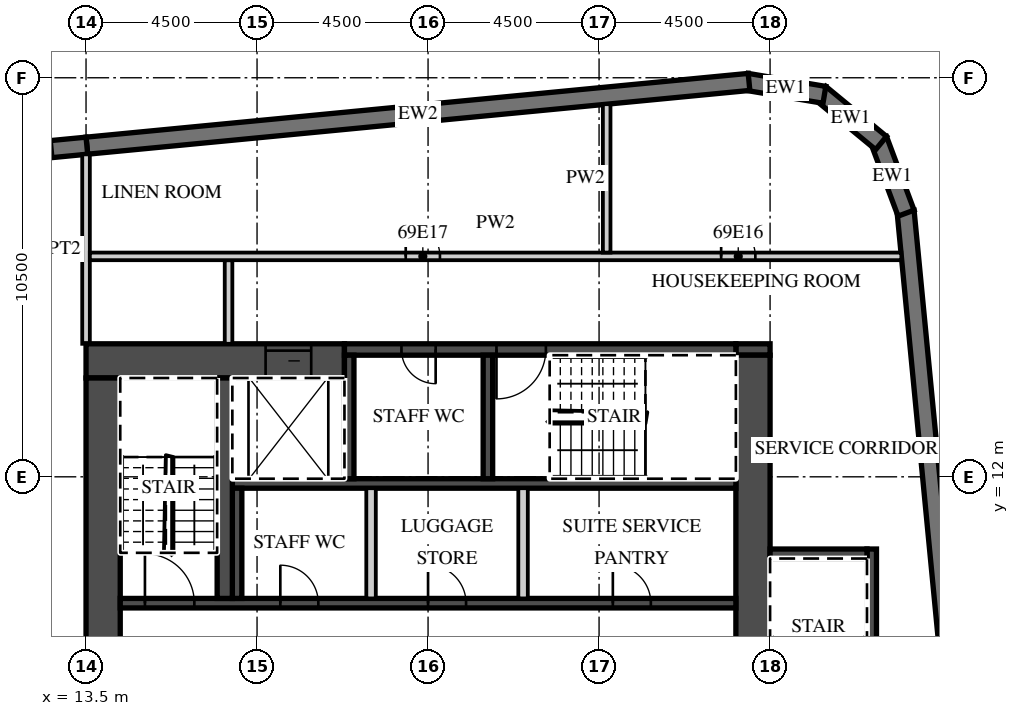
"""IFC4 building model, lengths in metres.
Left out: names, types, materials, properties, quantities, classifications, styles, units other than length and angle.
Written with IfcOpenShell. Run it as: python <this file> out.ifc"""

import sys

from ifc_helpers import new_model, si_unit, direction, frame, frame_2d, origin, place, context, subcontext, project, spatial, polyline, rectangle, outline, extrude, element, fill, save


model = new_model("IFC4")
c1 = context("Model", 3, precision=1e-05, world=origin(), true_north=direction((0.0, 1.0)))
c2 = subcontext(c1, "Body", "Model", "MODEL_VIEW")
j1 = project(units=[si_unit("LENGTHUNIT", "METRE"), si_unit("PLANEANGLEUNIT", "RADIAN")], contexts=[c1])
p1 = place(None, origin())
s1 = spatial("IfcSite", under=j1, at=p1, CompositionType="ELEMENT")
p2 = place(p1, origin())
s2 = spatial("IfcBuilding", under=s1, at=p2, CompositionType="ELEMENT")
p3 = place(p2, frame((0.0, 0.0, 278.4)))
s3 = spatial("IfcBuildingStorey", under=s2, at=p3, CompositionType="ELEMENT", Elevation=278.4)
p4 = place(p3, frame((38.132, -12.858, 0.0), z_axis=(0.0, 0.0, 1.0), x_axis=(-0.095847749461, 0.995396006082, 0.0)))
e1 = element("IfcWall", 1, at=p4, inside=s3, PredefinedType="SOLIDWALL", context=c2, shape_type="SweptSolid", body=[
    extrude(rectangle(XDim=32.0, YDim=0.45, at=frame_2d((16.0, 0.0))), origin(), (0.0, 0.0, 1.0), 3.02),
])
p5 = place(p3, frame((35.078, 18.938, 0.0), z_axis=(0.0, 0.0, 1.0), x_axis=(-0.350192909346, 0.936677599948, 0.0)))
e2 = element("IfcWall", 2, at=p5, inside=s3, PredefinedType="SOLIDWALL", context=c2, shape_type="SweptSolid", body=[
    extrude(outline(polyline([(0.0, -0.225), (2.071, -0.225), (1.95, 0.225), (0.121, 0.225), (0.0, -0.225)])), origin(), (0.0, 0.0, 1.0), 3.02),
])
p6 = place(p3, frame((34.421, 20.782, 0.0), z_axis=(0.0, 0.0, 1.0), x_axis=(-0.771593176315, 0.636116318187, 0.0)))
e3 = element("IfcWall", 3, at=p6, inside=s3, PredefinedType="SOLIDWALL", context=c2, shape_type="SweptSolid", body=[
    extrude(outline(polyline([(0.0, -0.225), (2.071, -0.225), (1.95, 0.225), (0.12, 0.225), (0.0, -0.225)])), origin(), (0.0, 0.0, 1.0), 3.02),
])
p7 = place(p3, frame((32.929, 22.051, 0.0), z_axis=(0.0, 0.0, 1.0), x_axis=(-0.986298144721, 0.164972633245, 0.0)))
e4 = element("IfcWall", 4, at=p7, inside=s3, PredefinedType="SOLIDWALL", context=c2, shape_type="SweptSolid", body=[
    extrude(outline(polyline([(0.0, -0.225), (2.07, -0.225), (1.95, 0.225), (0.121, 0.225), (0.0, -0.225)])), origin(), (0.0, 0.0, 1.0), 3.02),
])
p8 = place(p3, frame((30.946, 22.391, 0.0), z_axis=(0.0, 0.0, 1.0), x_axis=(-0.995396397117, -0.095843688398, 0.0)))
e5 = element("IfcWall", 5, at=p8, inside=s3, PredefinedType="SOLIDWALL", context=c2, shape_type="SweptSolid", body=[
    extrude(rectangle(XDim=17.505, YDim=0.45, at=frame_2d((8.752, 0.0))), origin(), (0.0, 0.0, 1.0), 3.02),
])
p9 = place(p3, frame((13.521, 20.713, 0.0), z_axis=(0.0, 0.0, 1.0), x_axis=(-0.995396277313, -0.095844932638, 0.0)))
e6 = element("IfcWall", 6, at=p9, inside=s3, PredefinedType="SOLIDWALL", context=c2, shape_type="SweptSolid", body=[
    extrude(rectangle(XDim=51.495, YDim=0.45, at=frame_2d((25.748, 0.0))), origin(), (0.0, 0.0, 1.0), 3.02),
])
p10 = place(p9, frame((0.91, 0.0, 0.45)))
e7 = element("IfcOpeningElement", 7, at=p10, cuts=e6, PredefinedType="OPENING", context=c2, shape_type="SweptSolid", body=[
    extrude(rectangle(XDim=2.7, YDim=2.25, at=frame_2d((1.35, 1.125))), frame((0.0, 0.235, 0.0), z_axis=(0.0, -1.0, 0.0), x_axis=(1.0, 0.0, 0.0)), (0.0, 0.0, 1.0), 0.47),
])
p11 = place(p9, frame((5.431, 0.0, 0.45)))
e8 = element("IfcOpeningElement", 8, at=p11, cuts=e6, PredefinedType="OPENING", context=c2, shape_type="SweptSolid", body=[
    extrude(rectangle(XDim=2.7, YDim=2.25, at=frame_2d((1.35, 1.125))), frame((0.0, 0.235, 0.0), z_axis=(0.0, -1.0, 0.0), x_axis=(1.0, 0.0, 0.0)), (0.0, 0.0, 1.0), 0.47),
])
p12 = place(p9, frame((9.952, 0.0, 0.45)))
e9 = element("IfcOpeningElement", 9, at=p12, cuts=e6, PredefinedType="OPENING", context=c2, shape_type="SweptSolid", body=[
    extrude(rectangle(XDim=2.7, YDim=2.25, at=frame_2d((1.35, 1.125))), frame((0.0, 0.235, 0.0), z_axis=(0.0, -1.0, 0.0), x_axis=(1.0, 0.0, 0.0)), (0.0, 0.0, 1.0), 0.47),
])
p13 = place(p9, frame((14.473, 0.0, 0.45)))
e10 = element("IfcOpeningElement", 10, at=p13, cuts=e6, PredefinedType="OPENING", context=c2, shape_type="SweptSolid", body=[
    extrude(rectangle(XDim=2.7, YDim=2.25, at=frame_2d((1.35, 1.125))), frame((0.0, 0.235, 0.0), z_axis=(0.0, -1.0, 0.0), x_axis=(1.0, 0.0, 0.0)), (0.0, 0.0, 1.0), 0.47),
])
p14 = place(p9, frame((18.994, 0.0, 0.45)))
e11 = element("IfcOpeningElement", 11, at=p14, cuts=e6, PredefinedType="OPENING", context=c2, shape_type="SweptSolid", body=[
    extrude(rectangle(XDim=2.7, YDim=2.25, at=frame_2d((1.35, 1.125))), frame((0.0, 0.235, 0.0), z_axis=(0.0, -1.0, 0.0), x_axis=(1.0, 0.0, 0.0)), (0.0, 0.0, 1.0), 0.47),
])
p15 = place(p9, frame((23.514, 0.0, 0.45)))
e12 = element("IfcOpeningElement", 12, at=p15, cuts=e6, PredefinedType="OPENING", context=c2, shape_type="SweptSolid", body=[
    extrude(rectangle(XDim=2.7, YDim=2.25, at=frame_2d((1.35, 1.125))), frame((0.0, 0.235, 0.0), z_axis=(0.0, -1.0, 0.0), x_axis=(1.0, 0.0, 0.0)), (0.0, 0.0, 1.0), 0.47),
])
p16 = place(p9, frame((28.035, 0.0, 0.45)))
e13 = element("IfcOpeningElement", 13, at=p16, cuts=e6, PredefinedType="OPENING", context=c2, shape_type="SweptSolid", body=[
    extrude(rectangle(XDim=2.7, YDim=2.25, at=frame_2d((1.35, 1.125))), frame((0.0, 0.235, 0.0), z_axis=(0.0, -1.0, 0.0), x_axis=(1.0, 0.0, 0.0)), (0.0, 0.0, 1.0), 0.47),
])
p17 = place(p9, frame((32.556, 0.0, 0.45)))
e14 = element("IfcOpeningElement", 14, at=p17, cuts=e6, PredefinedType="OPENING", context=c2, shape_type="SweptSolid", body=[
    extrude(rectangle(XDim=2.7, YDim=2.25, at=frame_2d((1.35, 1.125))), frame((0.0, 0.235, 0.0), z_axis=(0.0, -1.0, 0.0), x_axis=(1.0, 0.0, 0.0)), (0.0, 0.0, 1.0), 0.47),
])
p18 = place(p9, frame((37.077, 0.0, 0.45)))
e15 = element("IfcOpeningElement", 15, at=p18, cuts=e6, PredefinedType="OPENING", context=c2, shape_type="SweptSolid", body=[
    extrude(rectangle(XDim=2.7, YDim=2.25, at=frame_2d((1.35, 1.125))), frame((0.0, 0.235, 0.0), z_axis=(0.0, -1.0, 0.0), x_axis=(1.0, 0.0, 0.0)), (0.0, 0.0, 1.0), 0.47),
])
p19 = place(p9, frame((41.598, 0.0, 0.45)))
e16 = element("IfcOpeningElement", 16, at=p19, cuts=e6, PredefinedType="OPENING", context=c2, shape_type="SweptSolid", body=[
    extrude(rectangle(XDim=2.7, YDim=2.25, at=frame_2d((1.35, 1.125))), frame((0.0, 0.235, 0.0), z_axis=(0.0, -1.0, 0.0), x_axis=(1.0, 0.0, 0.0)), (0.0, 0.0, 1.0), 0.47),
])
p20 = place(p9, frame((46.118, 0.0, 0.45)))
e17 = element("IfcOpeningElement", 17, at=p20, cuts=e6, PredefinedType="OPENING", context=c2, shape_type="SweptSolid", body=[
    extrude(rectangle(XDim=2.7, YDim=2.25, at=frame_2d((1.35, 1.125))), frame((0.0, 0.235, 0.0), z_axis=(0.0, -1.0, 0.0), x_axis=(1.0, 0.0, 0.0)), (0.0, 0.0, 1.0), 0.47),
])
p21 = place(p3, frame((13.5, 15.5, 0.0), z_axis=(0.0, 0.0, 1.0), x_axis=(0.0, 1.0, 0.0)))
e18 = element("IfcWall", 18, at=p21, inside=s3, PredefinedType="PARTITIONING", context=c2, shape_type="SweptSolid", body=[
    extrude(rectangle(XDim=4.985, YDim=0.2, at=frame_2d((2.493, 0.0))), origin(), (0.0, 0.0, 1.0), 3.02),
])
p22 = place(p3, frame((13.5, 15.05, 0.0), z_axis=(0.0, 0.0, 1.0), x_axis=(1.0, 0.0, 0.0)))
e19 = element("IfcWall", 19, at=p22, inside=s3, PredefinedType="SHEAR", context=c2, shape_type="SweptSolid", body=[
    extrude(rectangle(XDim=6.8, YDim=0.9, at=frame_2d((3.4, 0.0))), origin(), (0.0, 0.0, 1.0), 3.02),
])
p23 = place(p22, frame((4.725, 0.0, 0.0)))
e20 = element("IfcOpeningElement", 20, at=p23, cuts=e19, PredefinedType="OPENING", context=c2, shape_type="SweptSolid", body=[
    extrude(rectangle(XDim=1.2, YDim=2.1, at=frame_2d((0.6, 1.05))), frame((0.0, 0.46, 0.0), z_axis=(0.0, -1.0, 0.0), x_axis=(1.0, 0.0, 0.0)), (0.0, 0.0, 1.0), 0.92),
])
p24 = place(p3, frame((30.6, 15.35, 0.0), z_axis=(0.0, 0.0, 1.0), x_axis=(1.0, 0.0, 0.0)))
e21 = element("IfcWall", 21, at=p24, inside=s3, PredefinedType="SHEAR", context=c2, shape_type="SweptSolid", body=[
    extrude(rectangle(XDim=0.9, YDim=0.3, at=frame_2d((0.45, 0.0))), origin(), (0.0, 0.0, 1.0), 3.02),
])
p25 = place(p3, frame((20.3, 15.35, 0.0), z_axis=(0.0, 0.0, 1.0), x_axis=(1.0, 0.0, 0.0)))
e22 = element("IfcWall", 22, at=p25, inside=s3, PredefinedType="SHEAR", context=c2, shape_type="SweptSolid", body=[
    extrude(rectangle(XDim=10.3, YDim=0.3, at=frame_2d((5.15, 0.0))), origin(), (0.0, 0.0, 1.0), 3.02),
])
p26 = place(p25, frame((4.0, 0.0, 0.0)))
e23 = element("IfcOpeningElement", 23, at=p26, cuts=e22, PredefinedType="OPENING", context=c2, shape_type="SweptSolid", body=[
    extrude(rectangle(XDim=1.3, YDim=2.1, at=frame_2d((0.65, 1.05))), frame((0.0, 0.16, 0.0), z_axis=(0.0, -1.0, 0.0), x_axis=(1.0, 0.0, 0.0)), (0.0, 0.0, 1.0), 0.32),
])
p27 = place(p25, frame((1.5, 0.0, 0.0)))
e24 = element("IfcOpeningElement", 24, at=p27, cuts=e22, PredefinedType="OPENING", context=c2, shape_type="SweptSolid", body=[
    extrude(rectangle(XDim=0.9, YDim=2.1, at=frame_2d((0.45, 1.05))), frame((0.0, 0.16, 0.0), z_axis=(0.0, -1.0, 0.0), x_axis=(1.0, 0.0, 0.0)), (0.0, 0.0, 1.0), 0.32),
])
p28 = place(p3, frame((31.05, 2.4, 0.0), z_axis=(0.0, 0.0, 1.0), x_axis=(0.0, 1.0, 0.0)))
e25 = element("IfcWall", 25, at=p28, inside=s3, PredefinedType="SHEAR", context=c2, shape_type="SweptSolid", body=[
    extrude(rectangle(XDim=12.8, YDim=0.9, at=frame_2d((6.4, 0.0))), origin(), (0.0, 0.0, 1.0), 3.02),
])
p29 = place(p28, frame((0.2, 0.0, 0.0)))
e26 = element("IfcOpeningElement", 26, at=p29, cuts=e25, PredefinedType="OPENING", context=c2, shape_type="SweptSolid", body=[
    extrude(rectangle(XDim=1.1, YDim=2.1, at=frame_2d((0.55, 1.05))), frame((0.0, 0.46, 0.0), z_axis=(0.0, -1.0, 0.0), x_axis=(1.0, 0.0, 0.0)), (0.0, 0.0, 1.0), 0.92),
])
p30 = place(p3, frame((13.95, 2.4, 0.0), z_axis=(0.0, 0.0, 1.0), x_axis=(0.0, 1.0, 0.0)))
e27 = element("IfcWall", 27, at=p30, inside=s3, PredefinedType="SHEAR", context=c2, shape_type="SweptSolid", body=[
    extrude(rectangle(XDim=12.2, YDim=0.9, at=frame_2d((6.1, 0.0))), origin(), (0.0, 0.0, 1.0), 3.02),
])
p31 = place(p3, frame((14.4, 8.675, 0.0), z_axis=(0.0, 0.0, 1.0), x_axis=(1.0, 0.0, 0.0)))
e28 = element("IfcWall", 28, at=p31, inside=s3, PredefinedType="SHEAR", context=c2, shape_type="SweptSolid", body=[
    extrude(rectangle(XDim=16.2, YDim=0.25, at=frame_2d((8.1, 0.0))), origin(), (0.0, 0.0, 1.0), 3.02),
])
p32 = place(p31, frame((0.65, 0.0, 0.0)))
e29 = element("IfcOpeningElement", 29, at=p32, cuts=e28, PredefinedType="OPENING", context=c2, shape_type="SweptSolid", body=[
    extrude(rectangle(XDim=1.3, YDim=2.1, at=frame_2d((0.65, 1.05))), frame((0.0, 0.135, 0.0), z_axis=(0.0, -1.0, 0.0), x_axis=(1.0, 0.0, 0.0)), (0.0, 0.0, 1.0), 0.27),
])
p33 = place(p31, frame((12.962, 0.0, 0.0)))
e30 = element("IfcOpeningElement", 30, at=p33, cuts=e28, PredefinedType="OPENING", context=c2, shape_type="SweptSolid", body=[
    extrude(rectangle(XDim=1.0, YDim=2.1, at=frame_2d((0.5, 1.05))), frame((0.0, 0.135, 0.0), z_axis=(0.0, -1.0, 0.0), x_axis=(1.0, 0.0, 0.0)), (0.0, 0.0, 1.0), 0.27),
])
p34 = place(p31, frame((8.1, 0.0, 0.0)))
e31 = element("IfcOpeningElement", 31, at=p34, cuts=e28, PredefinedType="OPENING", context=c2, shape_type="SweptSolid", body=[
    extrude(rectangle(XDim=1.0, YDim=2.1, at=frame_2d((0.5, 1.05))), frame((0.0, 0.135, 0.0), z_axis=(0.0, -1.0, 0.0), x_axis=(1.0, 0.0, 0.0)), (0.0, 0.0, 1.0), 0.27),
])
p35 = place(p31, frame((4.212, 0.0, 0.0)))
e32 = element("IfcOpeningElement", 32, at=p35, cuts=e28, PredefinedType="OPENING", context=c2, shape_type="SweptSolid", body=[
    extrude(rectangle(XDim=1.0, YDim=2.1, at=frame_2d((0.5, 1.05))), frame((0.0, 0.135, 0.0), z_axis=(0.0, -1.0, 0.0), x_axis=(1.0, 0.0, 0.0)), (0.0, 0.0, 1.0), 0.27),
])
p36 = place(p3, frame((17.35, 11.825, 0.0), z_axis=(0.0, 0.0, 1.0), x_axis=(1.0, 0.0, 0.0)))
e33 = element("IfcWall", 33, at=p36, inside=s3, PredefinedType="SHEAR", context=c2, shape_type="SweptSolid", body=[
    extrude(rectangle(XDim=13.25, YDim=0.25, at=frame_2d((6.625, 0.0))), origin(), (0.0, 0.0, 1.0), 3.02),
])
p37 = place(p3, frame((17.475, 8.8, 0.0), z_axis=(0.0, 0.0, 1.0), x_axis=(0.0, 1.0, 0.0)))
e34 = element("IfcWall", 34, at=p37, inside=s3, PredefinedType="SHEAR", context=c2, shape_type="SweptSolid", body=[
    extrude(rectangle(XDim=2.9, YDim=0.25, at=frame_2d((1.45, 0.0))), origin(), (0.0, 0.0, 1.0), 3.02),
])
for number, where, z_axis, x_axis in (
    (35, (25.0, 8.8, 0.0), (0.0, 0.0, 1.0), (0.0, 1.0, 0.0)),
    (36, (21.0, 8.8, 0.0), (0.0, 0.0, 1.0), (0.0, 1.0, 0.0)),
):
    element("IfcWall", number, at=place(p3, frame(where, z_axis=z_axis, x_axis=x_axis)), inside=s3, PredefinedType="PARTITIONING", context=c2, shape_type="SweptSolid", body=[
        extrude(rectangle(XDim=2.9, YDim=0.25, at=frame_2d((1.45, 0.0))), origin(), (0.0, 0.0, 1.0), 3.02),
    ])
p38 = place(p3, frame((17.15, 8.8, 0.0), z_axis=(0.0, 0.0, 1.0), x_axis=(0.0, 1.0, 0.0)))
e37 = element("IfcWall", 37, at=p38, inside=s3, PredefinedType="SHEAR", context=c2, shape_type="SweptSolid", body=[
    extrude(rectangle(XDim=5.8, YDim=0.4, at=frame_2d((2.9, 0.0))), origin(), (0.0, 0.0, 1.0), 3.02),
])
for number, where, z_axis, x_axis in (
    (38, (20.425, 11.95, 0.0), (0.0, 0.0, 1.0), (0.0, 1.0, 0.0)),
    (39, (24.075, 11.95, 0.0), (0.0, 0.0, 1.0), (0.0, 1.0, 0.0)),
):
    element("IfcWall", number, at=place(p3, frame(where, z_axis=z_axis, x_axis=x_axis)), inside=s3, PredefinedType="SHEAR", context=c2, shape_type="SweptSolid", body=[
        extrude(rectangle(XDim=3.25, YDim=0.25, at=frame_2d((1.625, 0.0))), origin(), (0.0, 0.0, 1.0), 3.02),
    ])
p39 = place(p3, frame((34.175, 1.75, 0.0), z_axis=(0.0, 0.0, 1.0), x_axis=(0.0, 1.0, 0.0)))
e40 = element("IfcWall", 40, at=p39, inside=s3, PredefinedType="SHEAR", context=c2, shape_type="SweptSolid", body=[
    extrude(rectangle(XDim=8.35, YDim=0.25, at=frame_2d((4.175, 0.0))), origin(), (0.0, 0.0, 1.0), 3.02),
])
p40 = place(p3, frame((31.5, 9.975, 0.0), z_axis=(0.0, 0.0, 1.0), x_axis=(1.0, 0.0, 0.0)))
e41 = element("IfcWall", 41, at=p40, inside=s3, PredefinedType="SHEAR", context=c2, shape_type="SweptSolid", body=[
    extrude(rectangle(XDim=2.55, YDim=0.25, at=frame_2d((1.275, 0.0))), origin(), (0.0, 0.0, 1.0), 3.02),
])
p41 = place(p3, frame((17.25, 15.5, 0.0), z_axis=(0.0, 0.0, 1.0), x_axis=(0.0, 1.0, 0.0)))
e42 = element("IfcWall", 42, at=p41, inside=s3, PredefinedType="PARTITIONING", context=c2, shape_type="SweptSolid", body=[
    extrude(rectangle(XDim=2.2, YDim=0.2, at=frame_2d((1.1, 0.0))), origin(), (0.0, 0.0, 1.0), 3.02),
])
p42 = place(p3, frame((13.6, 17.8, 0.0), z_axis=(0.0, 0.0, 1.0), x_axis=(1.0, 0.0, 0.0)))
e43 = element("IfcWall", 43, at=p42, inside=s3, PredefinedType="PARTITIONING", context=c2, shape_type="SweptSolid", body=[
    extrude(rectangle(XDim=21.354, YDim=0.2, at=frame_2d((10.677, 0.0))), origin(), (0.0, 0.0, 1.0), 3.02),
])
p43 = place(p42, frame((16.613, 0.0, 0.0)))
e44 = element("IfcOpeningElement", 44, at=p43, cuts=e43, PredefinedType="OPENING", context=c2, shape_type="SweptSolid", body=[
    extrude(rectangle(XDim=0.9, YDim=2.1, at=frame_2d((0.45, 1.05))), frame((0.0, 0.11, 0.0), z_axis=(0.0, -1.0, 0.0), x_axis=(1.0, 0.0, 0.0)), (0.0, 0.0, 1.0), 0.22),
])
p44 = place(p42, frame((8.312, 0.0, 0.0)))
e45 = element("IfcOpeningElement", 45, at=p44, cuts=e43, PredefinedType="OPENING", context=c2, shape_type="SweptSolid", body=[
    extrude(rectangle(XDim=0.9, YDim=2.1, at=frame_2d((0.45, 1.05))), frame((0.0, 0.11, 0.0), z_axis=(0.0, -1.0, 0.0), x_axis=(1.0, 0.0, 0.0)), (0.0, 0.0, 1.0), 0.22),
])
p45 = place(p3, frame((27.2, 17.9, 0.0), z_axis=(0.0, 0.0, 1.0), x_axis=(0.0, 1.0, 0.0)))
e46 = element("IfcWall", 46, at=p45, inside=s3, PredefinedType="PARTITIONING", context=c2, shape_type="SweptSolid", body=[
    extrude(rectangle(XDim=3.905, YDim=0.2, at=frame_2d((1.953, 0.0))), origin(), (0.0, 0.0, 1.0), 3.02),
])
p46 = place(p10, origin())
e47 = element("IfcWindow", 47, at=p46, inside=s3, PartitioningType="SINGLE_PANEL", PredefinedType="WINDOW", context=c2, shape_type="SweptSolid", body=[
    extrude(rectangle(XDim=2.7, YDim=2.25, at=frame_2d((1.35, 1.125))), frame((0.0, 0.09, 0.0), z_axis=(0.0, -1.0, 0.0), x_axis=(1.0, 0.0, 0.0)), (0.0, 0.0, 1.0), 0.06),
])
fill(e7, e47)
p47 = place(p23, origin())
e48 = element("IfcDoor", 48, at=p47, inside=s3, OperationType="SLIDING_TO_LEFT", PredefinedType="DOOR", context=c2, shape_type="SweptSolid", body=[
    extrude(rectangle(XDim=1.2, YDim=2.1, at=frame_2d((0.6, 1.05))), frame((0.0, 0.025, 0.0), z_axis=(0.0, -1.0, 0.0), x_axis=(1.0, 0.0, 0.0)), (0.0, 0.0, 1.0), 0.05),
])
fill(e20, e48)
p48 = place(p32, origin())
e49 = element("IfcDoor", 49, at=p48, inside=s3, OperationType="SINGLE_SWING_LEFT", PredefinedType="DOOR", context=c2, shape_type="SweptSolid", body=[
    extrude(rectangle(XDim=1.3, YDim=2.1, at=frame_2d((0.65, 1.05))), frame((0.0, 0.025, 0.0), z_axis=(0.0, -1.0, 0.0), x_axis=(1.0, 0.0, 0.0)), (0.0, 0.0, 1.0), 0.05),
])
fill(e29, e49)
p49 = place(p26, origin())
e50 = element("IfcDoor", 50, at=p49, inside=s3, OperationType="SINGLE_SWING_LEFT", PredefinedType="DOOR", context=c2, shape_type="SweptSolid", body=[
    extrude(rectangle(XDim=1.3, YDim=2.1, at=frame_2d((0.65, 1.05))), frame((0.0, 0.025, 0.0), z_axis=(0.0, -1.0, 0.0), x_axis=(1.0, 0.0, 0.0)), (0.0, 0.0, 1.0), 0.05),
])
fill(e23, e50)
p50 = place(p27, origin())
e51 = element("IfcDoor", 51, at=p50, inside=s3, OperationType="SINGLE_SWING_RIGHT", PredefinedType="DOOR", context=c2, shape_type="SweptSolid", body=[
    extrude(rectangle(XDim=0.9, YDim=2.1, at=frame_2d((0.45, 1.05))), frame((0.0, 0.025, 0.0), z_axis=(0.0, -1.0, 0.0), x_axis=(1.0, 0.0, 0.0)), (0.0, 0.0, 1.0), 0.05),
])
fill(e24, e51)
p51 = place(p33, origin())
e52 = element("IfcDoor", 52, at=p51, inside=s3, OperationType="SINGLE_SWING_LEFT", PredefinedType="DOOR", context=c2, shape_type="SweptSolid", body=[
    extrude(rectangle(XDim=1.0, YDim=2.1, at=frame_2d((0.5, 1.05))), frame((0.0, 0.025, 0.0), z_axis=(0.0, -1.0, 0.0), x_axis=(1.0, 0.0, 0.0)), (0.0, 0.0, 1.0), 0.05),
])
fill(e30, e52)
p52 = place(p34, origin())
e53 = element("IfcDoor", 53, at=p52, inside=s3, OperationType="SINGLE_SWING_LEFT", PredefinedType="DOOR", context=c2, shape_type="SweptSolid", body=[
    extrude(rectangle(XDim=1.0, YDim=2.1, at=frame_2d((0.5, 1.05))), frame((0.0, 0.025, 0.0), z_axis=(0.0, -1.0, 0.0), x_axis=(1.0, 0.0, 0.0)), (0.0, 0.0, 1.0), 0.05),
])
fill(e31, e53)
p53 = place(p35, origin())
e54 = element("IfcDoor", 54, at=p53, inside=s3, OperationType="SINGLE_SWING_LEFT", PredefinedType="DOOR", context=c2, shape_type="SweptSolid", body=[
    extrude(rectangle(XDim=1.0, YDim=2.1, at=frame_2d((0.5, 1.05))), frame((0.0, 0.025, 0.0), z_axis=(0.0, -1.0, 0.0), x_axis=(1.0, 0.0, 0.0)), (0.0, 0.0, 1.0), 0.05),
])
fill(e32, e54)
p54 = place(p43, origin())
e55 = element("IfcDoor", 55, at=p54, inside=s3, OperationType="SINGLE_SWING_LEFT", PredefinedType="DOOR", context=c2, shape_type="SweptSolid", body=[
    extrude(rectangle(XDim=0.9, YDim=2.1, at=frame_2d((0.45, 1.05))), frame((0.0, 0.025, 0.0), z_axis=(0.0, -1.0, 0.0), x_axis=(1.0, 0.0, 0.0)), (0.0, 0.0, 1.0), 0.05),
])
fill(e44, e55)
p55 = place(p44, origin())
e56 = element("IfcDoor", 56, at=p55, inside=s3, OperationType="SINGLE_SWING_LEFT", PredefinedType="DOOR", context=c2, shape_type="SweptSolid", body=[
    extrude(rectangle(XDim=0.9, YDim=2.1, at=frame_2d((0.45, 1.05))), frame((0.0, 0.025, 0.0), z_axis=(0.0, -1.0, 0.0), x_axis=(1.0, 0.0, 0.0)), (0.0, 0.0, 1.0), 0.05),
])
fill(e45, e56)
save(model, sys.argv[1])
